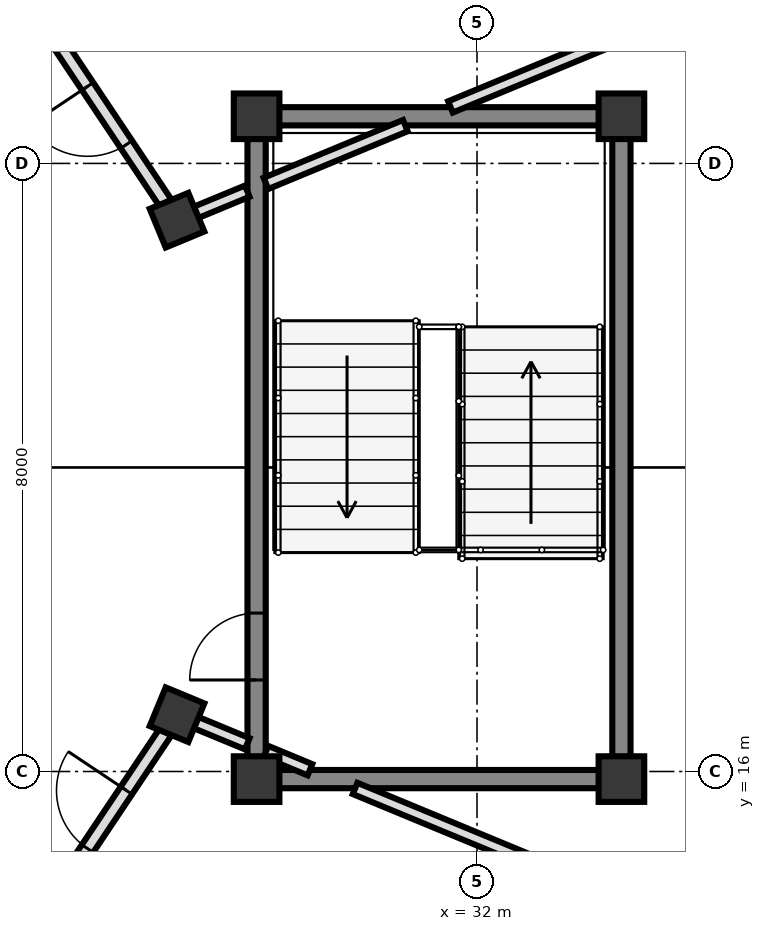
"""IFC4 building model, lengths in metres.
Left out: names, types, materials, properties, quantities, classifications, styles, units other than length and angle.
Written with IfcOpenShell. Run it as: python <this file> out.ifc"""

import sys

from ifc_helpers import new_model, si_unit, direction, frame, frame_2d, origin, origin_2d, place, context, subcontext, project, spatial, rectangle, extrude, element, fill, save


model = new_model("IFC4")
c1 = context("Model", 3, precision=1e-05, world=origin(), true_north=direction((0.0, 1.0)))
c2 = subcontext(c1, "Body", "Model", "MODEL_VIEW")
j1 = project(units=[si_unit("LENGTHUNIT", "METRE"), si_unit("PLANEANGLEUNIT", "RADIAN")], contexts=[c1])
p1 = place(None, origin())
s1 = spatial("IfcSite", under=j1, at=p1, CompositionType="ELEMENT")
p2 = place(p1, origin())
s2 = spatial("IfcBuilding", under=s1, at=p2, CompositionType="ELEMENT")
p3 = place(p2, frame((0.0, 0.0, 8.5)))
s3 = spatial("IfcBuildingStorey", under=s2, at=p3, CompositionType="ELEMENT", Elevation=8.5)
for number, where, z_axis, x_axis in (
    (1, (29.1, 15.9, 0.0), (0.0, 0.0, 1.0), (1.0, 0.0, 0.0)),
    (2, (33.9, 15.9, 0.0), (0.0, 0.0, 1.0), (1.0, 0.0, 0.0)),
    (3, (33.9, 24.62, 0.0), (0.0, 0.0, 1.0), (1.0, 0.0, 0.0)),
    (4, (29.1, 24.62, 0.0), (0.0, 0.0, 1.0), (1.0, 0.0, 0.0)),
):
    element("IfcColumn", number, at=place(p3, frame(where, z_axis=z_axis, x_axis=x_axis)), inside=s3, PredefinedType="COLUMN", context=c2, shape_type="SweptSolid", body=[
        extrude(rectangle(XDim=0.6, YDim=0.6, at=origin_2d()), origin(), (0.0, 0.0, 1.0), 4.0),
    ])
for number, where, z_axis, x_axis in (
    (5, (28.053, 23.253, 0.0), (0.0, 0.0, 1.0), (0.924, 0.383, 0.0)),
    (6, (28.053, 16.747, 0.0), (0.0, 0.0, 1.0), (0.924, -0.383, 0.0)),
):
    element("IfcColumn", number, at=place(p3, frame(where, z_axis=z_axis, x_axis=x_axis)), inside=s3, PredefinedType="COLUMN", context=c2, shape_type="SweptSolid", body=[
        extrude(rectangle(XDim=0.55, YDim=0.55, at=origin_2d()), origin(), (0.0, 0.0, 1.0), 4.0),
    ])
p4 = place(p3, frame((29.1, 16.192, 0.0), z_axis=(0.0, 0.0, 1.0), x_axis=(0.0, 1.0, 0.0)))
e7 = element("IfcWall", 7, at=p4, inside=s3, PredefinedType="SHEAR", context=c2, shape_type="SweptSolid", body=[
    extrude(rectangle(XDim=8.136, YDim=0.24, at=frame_2d((4.068, 0.0))), origin(), (0.0, 0.0, 1.0), 3.74),
])
p5 = place(p4, frame((1.012, 0.0, 0.0)))
e8 = element("IfcOpeningElement", 8, at=p5, cuts=e7, PredefinedType="OPENING", context=c2, shape_type="SweptSolid", body=[
    extrude(rectangle(XDim=0.88, YDim=2.1, at=frame_2d((0.44, 1.05))), frame((0.0, 0.13, 0.0), z_axis=(0.0, -1.0, 0.0), x_axis=(1.0, 0.0, 0.0)), (0.0, 0.0, 1.0), 0.26),
])
p6 = place(p3, frame((33.9, 24.328, 0.0), z_axis=(0.0, 0.0, 1.0), x_axis=(0.0, -1.0, 0.0)))
e9 = element("IfcWall", 9, at=p6, inside=s3, PredefinedType="SHEAR", context=c2, shape_type="SweptSolid", body=[
    extrude(rectangle(XDim=8.136, YDim=0.24, at=frame_2d((4.068, 0.0))), origin(), (0.0, 0.0, 1.0), 3.74),
])
for number, where, z_axis, x_axis in (
    (10, (33.608, 15.9, 0.0), (0.0, 0.0, 1.0), (-1.0, 0.0, 0.0)),
    (11, (33.608, 24.62, 0.0), (0.0, 0.0, 1.0), (-1.0, 0.0, 0.0)),
):
    element("IfcWall", number, at=place(p3, frame(where, z_axis=z_axis, x_axis=x_axis)), inside=s3, PredefinedType="SHEAR", context=c2, shape_type="SweptSolid", body=[
        extrude(rectangle(XDim=4.216, YDim=0.24, at=frame_2d((2.108, 0.0))), origin(), (0.0, 0.0, 1.0), 3.74),
    ])
p7 = place(p3, frame((28.3, 23.355, 0.0), z_axis=(0.0, 0.0, 1.0), x_axis=(0.924069600435, 0.382224245113, 0.0)))
e12 = element("IfcWall", 12, at=p7, inside=s3, PredefinedType="PARTITIONING", context=c2, shape_type="SweptSolid", body=[
    extrude(rectangle(XDim=0.733, YDim=0.16, at=frame_2d((0.366, 0.0))), origin(), (0.0, 0.0, 1.0), 3.7),
])
p8 = place(p3, frame((29.223, 23.737, 0.0), z_axis=(0.0, 0.0, 1.0), x_axis=(0.923817443679, 0.382833293686, 0.0)))
e13 = element("IfcWall", 13, at=p8, inside=s3, PredefinedType="PARTITIONING", context=c2, shape_type="SweptSolid", body=[
    extrude(rectangle(XDim=1.985, YDim=0.16, at=frame_2d((0.993, 0.0))), origin(), (0.0, 0.0, 1.0), 3.7),
])
p9 = place(p3, frame((31.651, 24.743, 0.0), z_axis=(0.0, 0.0, 1.0), x_axis=(0.923877739946, 0.382687759972, 0.0)))
e14 = element("IfcWall", 14, at=p9, inside=s3, PredefinedType="PARTITIONING", context=c2, shape_type="SweptSolid", body=[
    extrude(rectangle(XDim=4.813, YDim=0.16, at=frame_2d((2.407, 0.0))), origin(), (0.0, 0.0, 1.0), 3.7),
])
p10 = place(p3, frame((28.3, 16.645, 0.0), z_axis=(0.0, 0.0, 1.0), x_axis=(0.924069600435, -0.382224245113, 0.0)))
e15 = element("IfcWall", 15, at=p10, inside=s3, PredefinedType="PARTITIONING", context=c2, shape_type="SweptSolid", body=[
    extrude(rectangle(XDim=0.733, YDim=0.16, at=frame_2d((0.366, 0.0))), origin(), (0.0, 0.0, 1.0), 3.072),
])
p11 = place(p3, frame((29.223, 16.263, 0.0), z_axis=(0.0, 0.0, 1.0), x_axis=(0.923812676193, -0.382844797933, 0.0)))
e16 = element("IfcWall", 16, at=p11, inside=s3, PredefinedType="PARTITIONING", context=c2, shape_type="SweptSolid", body=[
    extrude(rectangle(XDim=0.627, YDim=0.16, at=frame_2d((0.313, 0.0))), origin(), (0.0, 0.0, 1.0), 3.072),
])
p12 = place(p3, frame((30.396, 15.777, 0.0), z_axis=(0.0, 0.0, 1.0), x_axis=(0.923864955254, -0.382718623082, 0.0)))
e17 = element("IfcWall", 17, at=p12, inside=s3, PredefinedType="PARTITIONING", context=c2, shape_type="SweptSolid", body=[
    extrude(rectangle(XDim=6.172, YDim=0.16, at=frame_2d((3.086, 0.0))), origin(), (0.0, 0.0, 1.0), 3.072),
])
p13 = place(p3, frame((27.902, 23.479, 0.0), z_axis=(0.0, 0.0, 1.0), x_axis=(-0.555797002478, 0.831318045056, 0.0)))
e18 = element("IfcWall", 18, at=p13, inside=s3, PredefinedType="PARTITIONING", context=c2, shape_type="SweptSolid", body=[
    extrude(rectangle(XDim=2.773, YDim=0.18, at=frame_2d((1.386, 0.0))), origin(), (0.0, 0.0, 1.0), 3.072),
])
p14 = place(p13, frame((0.926, 0.0, 0.0)))
e19 = element("IfcOpeningElement", 19, at=p14, cuts=e18, PredefinedType="OPENING", context=c2, shape_type="SweptSolid", body=[
    extrude(rectangle(XDim=0.92, YDim=2.1, at=frame_2d((0.46, 1.05))), frame((0.0, 0.1, 0.0), z_axis=(0.0, -1.0, 0.0), x_axis=(1.0, 0.0, 0.0)), (0.0, 0.0, 1.0), 0.2),
])
p15 = place(p3, frame((26.361, 14.216, 0.0), z_axis=(0.0, 0.0, 1.0), x_axis=(0.555797002478, 0.831318045056, 0.0)))
e20 = element("IfcWall", 20, at=p15, inside=s3, PredefinedType="PARTITIONING", context=c2, shape_type="SweptSolid", body=[
    extrude(rectangle(XDim=2.773, YDim=0.18, at=frame_2d((1.386, 0.0))), origin(), (0.0, 0.0, 1.0), 3.072),
])
p16 = place(p15, frame((0.926, 0.0, 0.0)))
e21 = element("IfcOpeningElement", 21, at=p16, cuts=e20, PredefinedType="OPENING", context=c2, shape_type="SweptSolid", body=[
    extrude(rectangle(XDim=0.92, YDim=2.1, at=frame_2d((0.46, 1.05))), frame((0.0, 0.1, 0.0), z_axis=(0.0, -1.0, 0.0), x_axis=(1.0, 0.0, 0.0)), (0.0, 0.0, 1.0), 0.2),
])
p17 = place(p5, origin())
e22 = element("IfcDoor", 22, at=p17, inside=s3, OperationType="SINGLE_SWING_LEFT", PredefinedType="DOOR", context=c2, shape_type="SweptSolid", body=[
    extrude(rectangle(XDim=0.88, YDim=2.1, at=frame_2d((0.44, 1.05))), frame((0.0, 0.025, 0.0), z_axis=(0.0, -1.0, 0.0), x_axis=(1.0, 0.0, 0.0)), (0.0, 0.0, 1.0), 0.05),
])
fill(e8, e22)
p18 = place(p14, origin())
e23 = element("IfcDoor", 23, at=p18, inside=s3, OperationType="SINGLE_SWING_RIGHT", PredefinedType="DOOR", context=c2, shape_type="SweptSolid", body=[
    extrude(rectangle(XDim=0.92, YDim=2.1, at=frame_2d((0.46, 1.05))), frame((0.0, 0.025, 0.0), z_axis=(0.0, -1.0, 0.0), x_axis=(1.0, 0.0, 0.0)), (0.0, 0.0, 1.0), 0.05),
])
fill(e19, e23)
p19 = place(p16, origin())
e24 = element("IfcDoor", 24, at=p19, inside=s3, OperationType="SINGLE_SWING_RIGHT", PredefinedType="DOOR", context=c2, shape_type="SweptSolid", body=[
    extrude(rectangle(XDim=0.92, YDim=2.1, at=frame_2d((0.46, 1.05))), frame((0.0, 0.025, 0.0), z_axis=(0.0, -1.0, 0.0), x_axis=(1.0, 0.0, 0.0)), (0.0, 0.0, 1.0), 0.05),
])
fill(e21, e24)
save(model, sys.argv[1])
